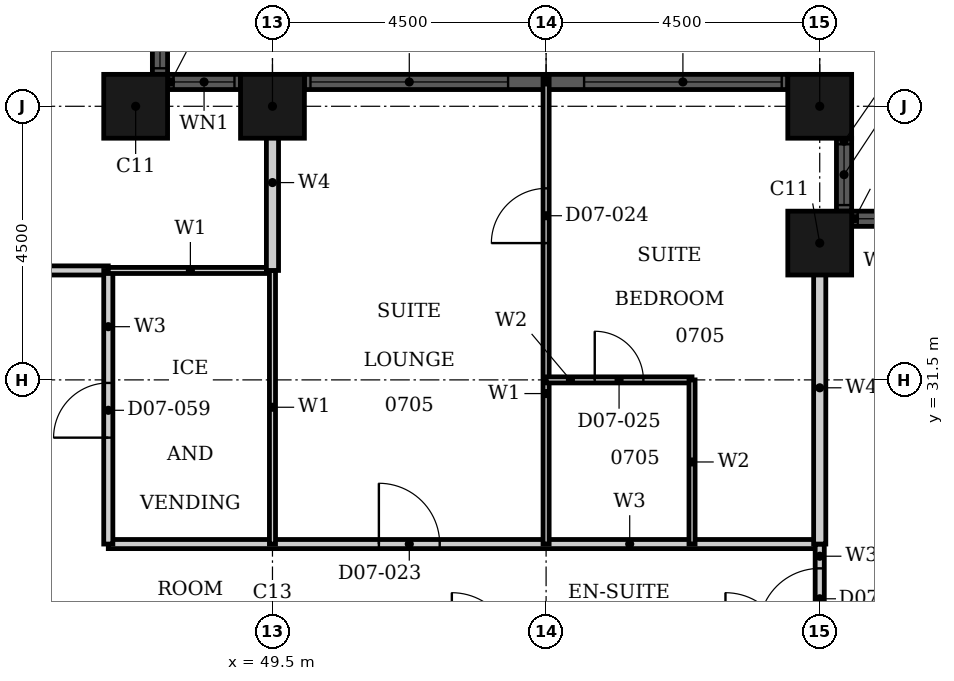
"""IFC4 building model, lengths in metres.
Left out: names, types, materials, properties, quantities, classifications, styles, units other than length and angle.
Written with IfcOpenShell. Run it as: python <this file> out.ifc"""

import sys

from ifc_helpers import new_model, si_unit, direction, frame, frame_2d, origin, origin_2d, place, context, subcontext, project, spatial, rectangle, hollow_rectangle, extrude, element, fill, save


model = new_model("IFC4")
c1 = context("Model", 3, precision=1e-05, world=origin(), true_north=direction((0.0, 1.0)))
c2 = subcontext(c1, "Body", "Model", "MODEL_VIEW")
j1 = project(units=[si_unit("LENGTHUNIT", "METRE"), si_unit("PLANEANGLEUNIT", "RADIAN")], contexts=[c1])
p1 = place(None, origin())
s1 = spatial("IfcSite", under=j1, at=p1, CompositionType="ELEMENT")
p2 = place(p1, origin())
s2 = spatial("IfcBuilding", under=s1, at=p2, CompositionType="ELEMENT")
p3 = place(p2, frame((0.0, 0.0, 37.2)))
s3 = spatial("IfcBuildingStorey", under=s2, at=p3, CompositionType="ELEMENT", Elevation=37.2)
for number, where, z_axis, x_axis in (
    (1, (58.5, 33.75, 0.0), (0.0, 0.0, 1.0), (1.0, 0.0, 0.0)),
    (2, (58.5, 36.0, 0.0), (0.0, 0.0, 1.0), (1.0, 0.0, 0.0)),
    (3, (49.5, 36.0, 0.0), (0.0, 0.0, 1.0), (1.0, 0.0, 0.0)),
    (4, (47.25, 36.0, 0.0), (0.0, 0.0, 1.0), (1.0, 0.0, 0.0)),
):
    element("IfcColumn", number, at=place(p3, frame(where, z_axis=z_axis, x_axis=x_axis)), inside=s3, PredefinedType="COLUMN", context=c2, shape_type="SweptSolid", body=[
        extrude(hollow_rectangle(XDim=1.05, YDim=1.05, WallThickness=0.034, at=origin_2d()), origin(), (0.0, 0.0, 1.0), 3.6),
    ])
p4 = place(p3, frame((60.225, 34.15, 0.0), z_axis=(0.0, 0.0, 1.0), x_axis=(-1.0, 0.0, 0.0)))
e5 = element("IfcWall", 5, at=p4, inside=s3, PredefinedType="SOLIDWALL", context=c2, shape_type="SweptSolid", body=[
    extrude(rectangle(XDim=1.2, YDim=0.25, at=frame_2d((0.6, 0.0))), origin(), (0.0, 0.0, 1.0), 3.6),
])
p5 = place(p4, frame((0.1, 0.0, 0.9)))
e6 = element("IfcOpeningElement", 6, at=p5, cuts=e5, PredefinedType="OPENING", context=c2, shape_type="SweptSolid", body=[
    extrude(rectangle(XDim=1.0, YDim=2.08, at=frame_2d((0.5, 1.04))), frame((0.0, 0.135, 0.0), z_axis=(0.0, -1.0, 0.0), x_axis=(1.0, 0.0, 0.0)), (0.0, 0.0, 1.0), 0.27),
])
p6 = place(p3, frame((58.9, 34.275, 0.0), z_axis=(0.0, 0.0, 1.0), x_axis=(0.0, 1.0, 0.0)))
e7 = element("IfcWall", 7, at=p6, inside=s3, PredefinedType="SOLIDWALL", context=c2, shape_type="SweptSolid", body=[
    extrude(rectangle(XDim=1.2, YDim=0.25, at=frame_2d((0.6, 0.0))), origin(), (0.0, 0.0, 1.0), 3.6),
])
p7 = place(p6, frame((0.1, 0.0, 0.9)))
e8 = element("IfcOpeningElement", 8, at=p7, cuts=e7, PredefinedType="OPENING", context=c2, shape_type="SweptSolid", body=[
    extrude(rectangle(XDim=1.0, YDim=2.08, at=frame_2d((0.5, 1.04))), frame((0.0, 0.135, 0.0), z_axis=(0.0, -1.0, 0.0), x_axis=(1.0, 0.0, 0.0)), (0.0, 0.0, 1.0), 0.27),
])
p8 = place(p3, frame((57.975, 36.4, 0.0), z_axis=(0.0, 0.0, 1.0), x_axis=(-1.0, 0.0, 0.0)))
e9 = element("IfcWall", 9, at=p8, inside=s3, PredefinedType="SOLIDWALL", context=c2, shape_type="SweptSolid", body=[
    extrude(rectangle(XDim=7.95, YDim=0.25, at=frame_2d((3.975, 0.0))), origin(), (0.0, 0.0, 1.0), 3.6),
])
p9 = place(p8, frame((0.1, 0.0, 0.9)))
e10 = element("IfcOpeningElement", 10, at=p9, cuts=e9, PredefinedType="OPENING", context=c2, shape_type="SweptSolid", body=[
    extrude(rectangle(XDim=3.25, YDim=2.08, at=frame_2d((1.625, 1.04))), frame((0.0, 0.135, 0.0), z_axis=(0.0, -1.0, 0.0), x_axis=(1.0, 0.0, 0.0)), (0.0, 0.0, 1.0), 0.27),
])
p10 = place(p8, frame((4.6, 0.0, 0.9)))
e11 = element("IfcOpeningElement", 11, at=p10, cuts=e9, PredefinedType="OPENING", context=c2, shape_type="SweptSolid", body=[
    extrude(rectangle(XDim=3.25, YDim=2.08, at=frame_2d((1.625, 1.04))), frame((0.0, 0.135, 0.0), z_axis=(0.0, -1.0, 0.0), x_axis=(1.0, 0.0, 0.0)), (0.0, 0.0, 1.0), 0.27),
])
p11 = place(p3, frame((48.975, 36.4, 0.0), z_axis=(0.0, 0.0, 1.0), x_axis=(-1.0, 0.0, 0.0)))
e12 = element("IfcWall", 12, at=p11, inside=s3, PredefinedType="SOLIDWALL", context=c2, shape_type="SweptSolid", body=[
    extrude(rectangle(XDim=1.2, YDim=0.25, at=frame_2d((0.6, 0.0))), origin(), (0.0, 0.0, 1.0), 3.6),
])
p12 = place(p11, frame((0.1, 0.0, 0.9)))
e13 = element("IfcOpeningElement", 13, at=p12, cuts=e12, PredefinedType="OPENING", context=c2, shape_type="SweptSolid", body=[
    extrude(rectangle(XDim=1.0, YDim=2.08, at=frame_2d((0.5, 1.04))), frame((0.0, 0.135, 0.0), z_axis=(0.0, -1.0, 0.0), x_axis=(1.0, 0.0, 0.0)), (0.0, 0.0, 1.0), 0.27),
])
p13 = place(p3, frame((47.65, 36.525, 0.0), z_axis=(0.0, 0.0, 1.0), x_axis=(0.0, 1.0, 0.0)))
e14 = element("IfcWall", 14, at=p13, inside=s3, PredefinedType="SOLIDWALL", context=c2, shape_type="SweptSolid", body=[
    extrude(rectangle(XDim=1.2, YDim=0.25, at=frame_2d((0.6, 0.0))), origin(), (0.0, 0.0, 1.0), 3.6),
])
p14 = place(p13, frame((0.1, 0.0, 0.9)))
e15 = element("IfcOpeningElement", 15, at=p14, cuts=e14, PredefinedType="OPENING", context=c2, shape_type="SweptSolid", body=[
    extrude(rectangle(XDim=1.0, YDim=2.08, at=frame_2d((0.5, 1.04))), frame((0.0, 0.135, 0.0), z_axis=(0.0, -1.0, 0.0), x_axis=(1.0, 0.0, 0.0)), (0.0, 0.0, 1.0), 0.27),
])
p15 = place(p3, frame((46.8, 28.8, 0.0), z_axis=(0.0, 0.0, 1.0), x_axis=(1.0, 0.0, 0.0)))
e16 = element("IfcWall", 16, at=p15, inside=s3, PredefinedType="PARTITIONING", context=c2, shape_type="SweptSolid", body=[
    extrude(rectangle(XDim=11.7, YDim=0.15, at=frame_2d((5.85, 0.0))), origin(), (0.0, 0.0, 1.0), 3.3),
])
p16 = place(p15, frame((4.45, 0.0, 0.0)))
e17 = element("IfcOpeningElement", 17, at=p16, cuts=e16, PredefinedType="OPENING", context=c2, shape_type="SweptSolid", body=[
    extrude(rectangle(XDim=1.0, YDim=2.1, at=frame_2d((0.5, 1.05))), frame((0.0, 0.085, 0.0), z_axis=(0.0, -1.0, 0.0), x_axis=(1.0, 0.0, 0.0)), (0.0, 0.0, 1.0), 0.17),
])
p17 = place(p3, frame((33.3, 33.3, 0.0), z_axis=(0.0, 0.0, 1.0), x_axis=(1.0, 0.0, 0.0)))
e18 = element("IfcWall", 18, at=p17, inside=s3, PredefinedType="PARTITIONING", context=c2, shape_type="SweptSolid", body=[
    extrude(rectangle(XDim=13.5, YDim=0.15, at=frame_2d((6.75, 0.0))), origin(), (0.0, 0.0, 1.0), 3.3),
])
p18 = place(p17, frame((10.15, 0.0, 0.0)))
e19 = element("IfcOpeningElement", 19, at=p18, cuts=e18, PredefinedType="OPENING", context=c2, shape_type="SweptSolid", body=[
    extrude(rectangle(XDim=1.0, YDim=2.1, at=frame_2d((0.5, 1.05))), frame((0.0, 0.085, 0.0), z_axis=(0.0, -1.0, 0.0), x_axis=(1.0, 0.0, 0.0)), (0.0, 0.0, 1.0), 0.17),
])
p19 = place(p17, frame((0.75, 0.0, 0.0)))
e20 = element("IfcOpeningElement", 20, at=p19, cuts=e18, PredefinedType="OPENING", context=c2, shape_type="SweptSolid", body=[
    extrude(rectangle(XDim=0.9, YDim=2.1, at=frame_2d((0.45, 1.05))), frame((0.0, 0.085, 0.0), z_axis=(0.0, -1.0, 0.0), x_axis=(1.0, 0.0, 0.0)), (0.0, 0.0, 1.0), 0.17),
])
p20 = place(p17, frame((4.35, 0.0, 0.0)))
e21 = element("IfcOpeningElement", 21, at=p20, cuts=e18, PredefinedType="OPENING", context=c2, shape_type="SweptSolid", body=[
    extrude(rectangle(XDim=0.9, YDim=2.1, at=frame_2d((0.45, 1.05))), frame((0.0, 0.085, 0.0), z_axis=(0.0, -1.0, 0.0), x_axis=(1.0, 0.0, 0.0)), (0.0, 0.0, 1.0), 0.17),
])
p21 = place(p3, frame((46.8, 28.8, 0.0), z_axis=(0.0, 0.0, 1.0), x_axis=(0.0, 1.0, 0.0)))
e22 = element("IfcWall", 22, at=p21, inside=s3, PredefinedType="PARTITIONING", context=c2, shape_type="SweptSolid", body=[
    extrude(rectangle(XDim=4.5, YDim=0.15, at=frame_2d((2.25, 0.0))), origin(), (0.0, 0.0, 1.0), 3.3),
])
p22 = place(p21, frame((1.75, 0.0, 0.0)))
e23 = element("IfcOpeningElement", 23, at=p22, cuts=e22, PredefinedType="OPENING", context=c2, shape_type="SweptSolid", body=[
    extrude(rectangle(XDim=0.9, YDim=2.1, at=frame_2d((0.45, 1.05))), frame((0.0, 0.085, 0.0), z_axis=(0.0, -1.0, 0.0), x_axis=(1.0, 0.0, 0.0)), (0.0, 0.0, 1.0), 0.17),
])
p23 = place(p3, frame((58.5, 27.0, 0.0), z_axis=(0.0, 0.0, 1.0), x_axis=(0.0, 1.0, 0.0)))
e24 = element("IfcWall", 24, at=p23, inside=s3, PredefinedType="PARTITIONING", context=c2, shape_type="SweptSolid", body=[
    extrude(rectangle(XDim=1.8, YDim=0.15, at=frame_2d((0.9, 0.0))), origin(), (0.0, 0.0, 1.0), 3.3),
])
p24 = place(p23, frame((0.4, 0.0, 0.0)))
e25 = element("IfcOpeningElement", 25, at=p24, cuts=e24, PredefinedType="OPENING", context=c2, shape_type="SweptSolid", body=[
    extrude(rectangle(XDim=1.0, YDim=2.1, at=frame_2d((0.5, 1.05))), frame((0.0, 0.085, 0.0), z_axis=(0.0, -1.0, 0.0), x_axis=(1.0, 0.0, 0.0)), (0.0, 0.0, 1.0), 0.17),
])
p25 = place(p3, frame((46.8, 33.3, 0.0), z_axis=(0.0, 0.0, 1.0), x_axis=(1.0, 0.0, 0.0)))
e26 = element("IfcWall", 26, at=p25, inside=s3, PredefinedType="PARTITIONING", context=c2, shape_type="SweptSolid", body=[
    extrude(rectangle(XDim=2.7, YDim=0.1, at=frame_2d((1.35, 0.0))), origin(), (0.0, 0.0, 1.0), 3.3),
])
p26 = place(p3, frame((49.5, 28.8, 0.0), z_axis=(0.0, 0.0, 1.0), x_axis=(0.0, 1.0, 0.0)))
e27 = element("IfcWall", 27, at=p26, inside=s3, PredefinedType="PARTITIONING", context=c2, shape_type="SweptSolid", body=[
    extrude(rectangle(XDim=4.5, YDim=0.1, at=frame_2d((2.25, 0.0))), origin(), (0.0, 0.0, 1.0), 2.38),
])
p27 = place(p3, frame((54.0, 28.8, 0.0), z_axis=(0.0, 0.0, 1.0), x_axis=(0.0, 1.0, 0.0)))
e28 = element("IfcWall", 28, at=p27, inside=s3, PredefinedType="PARTITIONING", context=c2, shape_type="SweptSolid", body=[
    extrude(rectangle(XDim=7.665, YDim=0.1, at=frame_2d((3.833, 0.0))), origin(), (0.0, 0.0, 1.0), 3.3),
])
p28 = place(p27, frame((4.95, 0.0, 0.0)))
e29 = element("IfcOpeningElement", 29, at=p28, cuts=e28, PredefinedType="OPENING", context=c2, shape_type="SweptSolid", body=[
    extrude(rectangle(XDim=0.9, YDim=2.1, at=frame_2d((0.45, 1.05))), frame((0.0, 0.06, 0.0), z_axis=(0.0, -1.0, 0.0), x_axis=(1.0, 0.0, 0.0)), (0.0, 0.0, 1.0), 0.12),
])
p29 = place(p3, frame((49.5, 33.3, 0.0), z_axis=(0.0, 0.0, 1.0), x_axis=(0.0, 1.0, 0.0)))
e30 = element("IfcWall", 30, at=p29, inside=s3, PredefinedType="PARTITIONING", context=c2, shape_type="SweptSolid", body=[
    extrude(rectangle(XDim=2.89, YDim=0.2, at=frame_2d((1.445, 0.0))), origin(), (0.0, 0.0, 1.0), 2.38),
])
p30 = place(p3, frame((58.5, 28.8, 0.0), z_axis=(0.0, 0.0, 1.0), x_axis=(0.0, 1.0, 0.0)))
e31 = element("IfcWall", 31, at=p30, inside=s3, PredefinedType="PARTITIONING", context=c2, shape_type="SweptSolid", body=[
    extrude(rectangle(XDim=5.14, YDim=0.2, at=frame_2d((2.57, 0.0))), origin(), (0.0, 0.0, 1.0), 3.3),
])
p31 = place(p3, frame((54.0, 31.5, 0.0), z_axis=(0.0, 0.0, 1.0), x_axis=(1.0, 0.0, 0.0)))
e32 = element("IfcWall", 32, at=p31, inside=s3, PredefinedType="PARTITIONING", context=c2, shape_type="SweptSolid", body=[
    extrude(rectangle(XDim=2.4, YDim=0.1, at=frame_2d((1.2, 0.0))), origin(), (0.0, 0.0, 1.0), 2.58),
])
p32 = place(p31, frame((0.8, 0.0, 0.0)))
e33 = element("IfcOpeningElement", 33, at=p32, cuts=e32, PredefinedType="OPENING", context=c2, shape_type="SweptSolid", body=[
    extrude(rectangle(XDim=0.8, YDim=2.1, at=frame_2d((0.4, 1.05))), frame((0.0, 0.06, 0.0), z_axis=(0.0, -1.0, 0.0), x_axis=(1.0, 0.0, 0.0)), (0.0, 0.0, 1.0), 0.12),
])
p33 = place(p3, frame((56.4, 28.8, 0.0), z_axis=(0.0, 0.0, 1.0), x_axis=(0.0, 1.0, 0.0)))
e34 = element("IfcWall", 34, at=p33, inside=s3, PredefinedType="PARTITIONING", context=c2, shape_type="SweptSolid", body=[
    extrude(rectangle(XDim=2.7, YDim=0.1, at=frame_2d((1.35, 0.0))), origin(), (0.0, 0.0, 1.0), 3.3),
])
p34 = place(p5, origin())
e35 = element("IfcWindow", 35, at=p34, inside=s3, PartitioningType="SINGLE_PANEL", PredefinedType="WINDOW", context=c2, shape_type="SweptSolid", body=[
    extrude(rectangle(XDim=1.0, YDim=2.08, at=frame_2d((0.5, 1.04))), frame((0.0, 0.03, 0.0), z_axis=(0.0, -1.0, 0.0), x_axis=(1.0, 0.0, 0.0)), (0.0, 0.0, 1.0), 0.06),
])
fill(e6, e35)
p35 = place(p7, origin())
e36 = element("IfcWindow", 36, at=p35, inside=s3, PartitioningType="SINGLE_PANEL", PredefinedType="WINDOW", context=c2, shape_type="SweptSolid", body=[
    extrude(rectangle(XDim=1.0, YDim=2.08, at=frame_2d((0.5, 1.04))), frame((0.0, 0.03, 0.0), z_axis=(0.0, -1.0, 0.0), x_axis=(1.0, 0.0, 0.0)), (0.0, 0.0, 1.0), 0.06),
])
fill(e8, e36)
p36 = place(p9, origin())
e37 = element("IfcWindow", 37, at=p36, inside=s3, PartitioningType="SINGLE_PANEL", PredefinedType="WINDOW", context=c2, shape_type="SweptSolid", body=[
    extrude(rectangle(XDim=3.25, YDim=2.08, at=frame_2d((1.625, 1.04))), frame((0.0, 0.03, 0.0), z_axis=(0.0, -1.0, 0.0), x_axis=(1.0, 0.0, 0.0)), (0.0, 0.0, 1.0), 0.06),
])
fill(e10, e37)
p37 = place(p10, origin())
e38 = element("IfcWindow", 38, at=p37, inside=s3, PartitioningType="SINGLE_PANEL", PredefinedType="WINDOW", context=c2, shape_type="SweptSolid", body=[
    extrude(rectangle(XDim=3.25, YDim=2.08, at=frame_2d((1.625, 1.04))), frame((0.0, 0.03, 0.0), z_axis=(0.0, -1.0, 0.0), x_axis=(1.0, 0.0, 0.0)), (0.0, 0.0, 1.0), 0.06),
])
fill(e11, e38)
p38 = place(p12, origin())
e39 = element("IfcWindow", 39, at=p38, inside=s3, PartitioningType="SINGLE_PANEL", PredefinedType="WINDOW", context=c2, shape_type="SweptSolid", body=[
    extrude(rectangle(XDim=1.0, YDim=2.08, at=frame_2d((0.5, 1.04))), frame((0.0, 0.03, 0.0), z_axis=(0.0, -1.0, 0.0), x_axis=(1.0, 0.0, 0.0)), (0.0, 0.0, 1.0), 0.06),
])
fill(e13, e39)
p39 = place(p14, origin())
e40 = element("IfcWindow", 40, at=p39, inside=s3, PartitioningType="SINGLE_PANEL", PredefinedType="WINDOW", context=c2, shape_type="SweptSolid", body=[
    extrude(rectangle(XDim=1.0, YDim=2.08, at=frame_2d((0.5, 1.04))), frame((0.0, 0.03, 0.0), z_axis=(0.0, -1.0, 0.0), x_axis=(1.0, 0.0, 0.0)), (0.0, 0.0, 1.0), 0.06),
])
fill(e15, e40)
p40 = place(p16, origin())
e41 = element("IfcDoor", 41, at=p40, inside=s3, OperationType="SINGLE_SWING_LEFT", PredefinedType="DOOR", context=c2, shape_type="SweptSolid", body=[
    extrude(rectangle(XDim=1.0, YDim=2.1, at=frame_2d((0.5, 1.05))), frame((0.0, 0.025, 0.0), z_axis=(0.0, -1.0, 0.0), x_axis=(1.0, 0.0, 0.0)), (0.0, 0.0, 1.0), 0.05),
])
fill(e17, e41)
p41 = place(p28, origin())
e42 = element("IfcDoor", 42, at=p41, inside=s3, OperationType="SINGLE_SWING_RIGHT", PredefinedType="DOOR", context=c2, shape_type="SweptSolid", body=[
    extrude(rectangle(XDim=0.9, YDim=2.1, at=frame_2d((0.45, 1.05))), frame((0.0, 0.025, 0.0), z_axis=(0.0, -1.0, 0.0), x_axis=(1.0, 0.0, 0.0)), (0.0, 0.0, 1.0), 0.05),
])
fill(e29, e42)
p42 = place(p32, origin())
e43 = element("IfcDoor", 43, at=p42, inside=s3, OperationType="SINGLE_SWING_RIGHT", PredefinedType="DOOR", context=c2, shape_type="SweptSolid", body=[
    extrude(rectangle(XDim=0.8, YDim=2.1, at=frame_2d((0.4, 1.05))), frame((0.0, 0.025, 0.0), z_axis=(0.0, -1.0, 0.0), x_axis=(1.0, 0.0, 0.0)), (0.0, 0.0, 1.0), 0.05),
])
fill(e33, e43)
p43 = place(p24, origin())
e44 = element("IfcDoor", 44, at=p43, inside=s3, OperationType="SINGLE_SWING_LEFT", PredefinedType="DOOR", context=c2, shape_type="SweptSolid", body=[
    extrude(rectangle(XDim=1.0, YDim=2.1, at=frame_2d((0.5, 1.05))), frame((0.0, 0.025, 0.0), z_axis=(0.0, -1.0, 0.0), x_axis=(1.0, 0.0, 0.0)), (0.0, 0.0, 1.0), 0.05),
])
fill(e25, e44)
p44 = place(p22, origin())
e45 = element("IfcDoor", 45, at=p44, inside=s3, OperationType="SINGLE_SWING_RIGHT", PredefinedType="DOOR", context=c2, shape_type="SweptSolid", body=[
    extrude(rectangle(XDim=0.9, YDim=2.1, at=frame_2d((0.45, 1.05))), frame((0.0, 0.025, 0.0), z_axis=(0.0, -1.0, 0.0), x_axis=(1.0, 0.0, 0.0)), (0.0, 0.0, 1.0), 0.05),
])
fill(e23, e45)
save(model, sys.argv[1])
